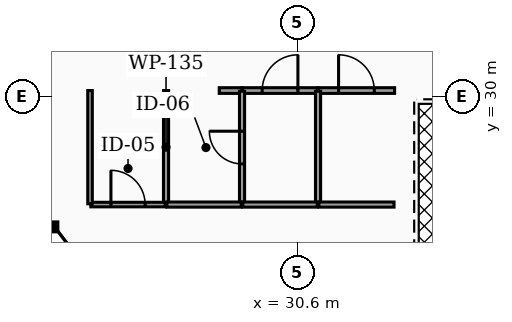
"""IFC4 building model, lengths in metres.
Left out: names, types, materials, properties, quantities, classifications, styles, units other than length and angle.
Written with IfcOpenShell. Run it as: python <this file> out.ifc"""

import sys

from ifc_helpers import new_model, si_unit, direction, frame, frame_2d, origin, place, context, subcontext, project, spatial, rectangle, extrude, element, fill, save


model = new_model("IFC4")
c1 = context("Model", 3, precision=1e-05, world=origin(), true_north=direction((0.0, 1.0)))
c2 = subcontext(c1, "Body", "Model", "MODEL_VIEW")
j1 = project(units=[si_unit("LENGTHUNIT", "METRE"), si_unit("PLANEANGLEUNIT", "RADIAN")], contexts=[c1])
p1 = place(None, origin())
s1 = spatial("IfcSite", under=j1, at=p1, CompositionType="ELEMENT")
p2 = place(p1, origin())
s2 = spatial("IfcBuilding", under=s1, at=p2, CompositionType="ELEMENT")
p3 = place(p2, frame((0.0, 0.0, 179.52)))
s3 = spatial("IfcBuildingStorey", under=s2, at=p3, CompositionType="ELEMENT", Elevation=179.52)
p4 = place(p3, frame((28.55, 30.15, 0.0), z_axis=(0.0, 0.0, 1.0), x_axis=(1.0, 0.0, 0.0)))
e1 = element("IfcWall", 1, at=p4, inside=s3, PredefinedType="PARTITIONING", context=c2, shape_type="SweptSolid", body=[
    extrude(rectangle(XDim=0.595, YDim=0.15, at=frame_2d((0.297, 0.0))), origin(), (0.0, 0.0, 1.0), 2.457),
])
p5 = place(p3, frame((29.155, 30.15, 0.0), z_axis=(0.0, 0.0, 1.0), x_axis=(1.0, 0.0, 0.0)))
e2 = element("IfcWall", 2, at=p5, inside=s3, PredefinedType="PARTITIONING", context=c2, shape_type="SweptSolid", body=[
    extrude(rectangle(XDim=1.99, YDim=0.15, at=frame_2d((0.995, 0.0))), origin(), (0.0, 0.0, 1.0), 2.457),
])
p6 = place(p5, frame((0.525, 0.0, 0.0)))
e3 = element("IfcOpeningElement", 3, at=p6, cuts=e2, PredefinedType="OPENING", context=c2, shape_type="SweptSolid", body=[
    extrude(rectangle(XDim=0.94, YDim=2.05, at=frame_2d((0.47, 1.025))), frame((0.0, 0.085, 0.0), z_axis=(0.0, -1.0, 0.0), x_axis=(1.0, 0.0, 0.0)), (0.0, 0.0, 1.0), 0.17),
])
p7 = place(p3, frame((31.155, 30.15, 0.0), z_axis=(0.0, 0.0, 1.0), x_axis=(1.0, 0.0, 0.0)))
e4 = element("IfcWall", 4, at=p7, inside=s3, PredefinedType="PARTITIONING", context=c2, shape_type="SweptSolid", body=[
    extrude(rectangle(XDim=2.01, YDim=0.15, at=frame_2d((1.005, 0.0))), origin(), (0.0, 0.0, 1.0), 2.457),
])
p8 = place(p7, frame((0.535, 0.0, 0.0)))
e5 = element("IfcOpeningElement", 5, at=p8, cuts=e4, PredefinedType="OPENING", context=c2, shape_type="SweptSolid", body=[
    extrude(rectangle(XDim=0.94, YDim=2.05, at=frame_2d((0.47, 1.025))), frame((0.0, 0.085, 0.0), z_axis=(0.0, -1.0, 0.0), x_axis=(1.0, 0.0, 0.0)), (0.0, 0.0, 1.0), 0.17),
])
p9 = place(p3, frame((27.15, 27.17, 0.0), z_axis=(0.0, 0.0, 1.0), x_axis=(0.0, 1.0, 0.0)))
e6 = element("IfcWall", 6, at=p9, inside=s3, PredefinedType="PARTITIONING", context=c2, shape_type="SweptSolid", body=[
    extrude(rectangle(XDim=2.98, YDim=0.135, at=frame_2d((1.49, 0.0))), origin(), (0.0, 0.0, 1.0), 2.457),
])
p10 = place(p3, frame((25.17, 27.15, 0.0), z_axis=(0.0, 0.0, 1.0), x_axis=(1.0, 0.0, 0.0)))
e7 = element("IfcWall", 7, at=p10, inside=s3, PredefinedType="PARTITIONING", context=c2, shape_type="SweptSolid", body=[
    extrude(rectangle(XDim=1.96, YDim=0.12, at=frame_2d((0.98, 0.0))), origin(), (0.0, 0.0, 1.0), 2.457),
])
p11 = place(p10, frame((0.53, 0.0, 0.0)))
e8 = element("IfcOpeningElement", 8, at=p11, cuts=e7, PredefinedType="OPENING", context=c2, shape_type="SweptSolid", body=[
    extrude(rectangle(XDim=0.9, YDim=2.05, at=frame_2d((0.45, 1.025))), frame((0.0, 0.07, 0.0), z_axis=(0.0, -1.0, 0.0), x_axis=(1.0, 0.0, 0.0)), (0.0, 0.0, 1.0), 0.14),
])
p12 = place(p3, frame((25.15, 27.17, 0.0), z_axis=(0.0, 0.0, 1.0), x_axis=(0.0, 1.0, 0.0)))
e9 = element("IfcWall", 9, at=p12, inside=s3, PredefinedType="PARTITIONING", context=c2, shape_type="SweptSolid", body=[
    extrude(rectangle(XDim=2.98, YDim=0.12, at=frame_2d((1.49, 0.0))), origin(), (0.0, 0.0, 1.0), 2.457),
])
p13 = place(p3, frame((29.15, 27.17, 0.0), z_axis=(0.0, 0.0, 1.0), x_axis=(0.0, 1.0, 0.0)))
e10 = element("IfcWall", 10, at=p13, inside=s3, PredefinedType="PARTITIONING", context=c2, shape_type="SweptSolid", body=[
    extrude(rectangle(XDim=2.96, YDim=0.135, at=frame_2d((1.48, 0.0))), origin(), (0.0, 0.0, 1.0), 2.457),
])
p14 = place(p13, frame((1.05, 0.0, 0.0)))
e11 = element("IfcOpeningElement", 11, at=p14, cuts=e10, PredefinedType="OPENING", context=c2, shape_type="SweptSolid", body=[
    extrude(rectangle(XDim=0.86, YDim=2.05, at=frame_2d((0.43, 1.025))), frame((0.0, 0.077, 0.0), z_axis=(0.0, -1.0, 0.0), x_axis=(1.0, 0.0, 0.0)), (0.0, 0.0, 1.0), 0.155),
])
p15 = place(p3, frame((27.17, 27.15, 0.0), z_axis=(0.0, 0.0, 1.0), x_axis=(1.0, 0.0, 0.0)))
e12 = element("IfcWall", 12, at=p15, inside=s3, PredefinedType="PARTITIONING", context=c2, shape_type="SweptSolid", body=[
    extrude(rectangle(XDim=1.96, YDim=0.135, at=frame_2d((0.98, 0.0))), origin(), (0.0, 0.0, 1.0), 2.457),
])
p16 = place(p3, frame((31.15, 27.17, 0.0), z_axis=(0.0, 0.0, 1.0), x_axis=(0.0, 1.0, 0.0)))
e13 = element("IfcWall", 13, at=p16, inside=s3, PredefinedType="PARTITIONING", context=c2, shape_type="SweptSolid", body=[
    extrude(rectangle(XDim=2.96, YDim=0.135, at=frame_2d((1.48, 0.0))), origin(), (0.0, 0.0, 1.0), 2.457),
])
p17 = place(p3, frame((29.17, 27.15, 0.0), z_axis=(0.0, 0.0, 1.0), x_axis=(1.0, 0.0, 0.0)))
e14 = element("IfcWall", 14, at=p17, inside=s3, PredefinedType="PARTITIONING", context=c2, shape_type="SweptSolid", body=[
    extrude(rectangle(XDim=1.96, YDim=0.135, at=frame_2d((0.98, 0.0))), origin(), (0.0, 0.0, 1.0), 2.457),
])
p18 = place(p3, frame((31.17, 27.15, 0.0), z_axis=(0.0, 0.0, 1.0), x_axis=(1.0, 0.0, 0.0)))
e15 = element("IfcWall", 15, at=p18, inside=s3, PredefinedType="PARTITIONING", context=c2, shape_type="SweptSolid", body=[
    extrude(rectangle(XDim=1.98, YDim=0.135, at=frame_2d((0.99, 0.0))), origin(), (0.0, 0.0, 1.0), 2.457),
])
p19 = place(p6, origin())
e16 = element("IfcDoor", 16, at=p19, inside=s3, OperationType="SINGLE_SWING_RIGHT", PredefinedType="DOOR", context=c2, shape_type="SweptSolid", body=[
    extrude(rectangle(XDim=0.94, YDim=2.05, at=frame_2d((0.47, 1.025))), frame((0.0, 0.025, 0.0), z_axis=(0.0, -1.0, 0.0), x_axis=(1.0, 0.0, 0.0)), (0.0, 0.0, 1.0), 0.05),
])
fill(e3, e16)
p20 = place(p8, origin())
e17 = element("IfcDoor", 17, at=p20, inside=s3, OperationType="SINGLE_SWING_LEFT", PredefinedType="DOOR", context=c2, shape_type="SweptSolid", body=[
    extrude(rectangle(XDim=0.94, YDim=2.05, at=frame_2d((0.47, 1.025))), frame((0.0, 0.025, 0.0), z_axis=(0.0, -1.0, 0.0), x_axis=(1.0, 0.0, 0.0)), (0.0, 0.0, 1.0), 0.05),
])
fill(e5, e17)
p21 = place(p11, origin())
e18 = element("IfcDoor", 18, at=p21, inside=s3, OperationType="SINGLE_SWING_LEFT", PredefinedType="DOOR", context=c2, shape_type="SweptSolid", body=[
    extrude(rectangle(XDim=0.9, YDim=2.05, at=frame_2d((0.45, 1.025))), frame((0.0, 0.025, 0.0), z_axis=(0.0, -1.0, 0.0), x_axis=(1.0, 0.0, 0.0)), (0.0, 0.0, 1.0), 0.05),
])
fill(e8, e18)
p22 = place(p14, origin())
e19 = element("IfcDoor", 19, at=p22, inside=s3, OperationType="SINGLE_SWING_RIGHT", PredefinedType="DOOR", context=c2, shape_type="SweptSolid", body=[
    extrude(rectangle(XDim=0.86, YDim=2.05, at=frame_2d((0.43, 1.025))), frame((0.0, 0.025, 0.0), z_axis=(0.0, -1.0, 0.0), x_axis=(1.0, 0.0, 0.0)), (0.0, 0.0, 1.0), 0.05),
])
fill(e11, e19)
save(model, sys.argv[1])
